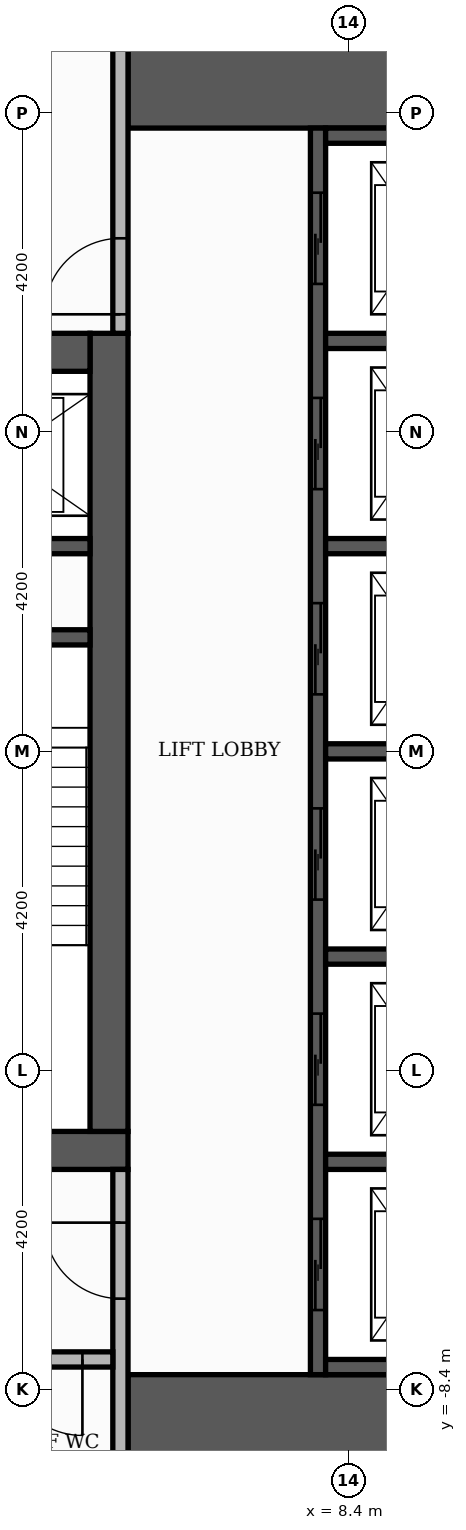
"""IFC4 building model, lengths in metres.
Left out: names, types, materials, properties, quantities, classifications, styles, units other than length and angle.
Written with IfcOpenShell. Run it as: python <this file> out.ifc"""

import sys

from ifc_helpers import new_model, si_unit, direction, frame, frame_2d, origin, place, context, subcontext, project, spatial, rectangle, extrude, element, fill, save


model = new_model("IFC4")
c1 = context("Model", 3, precision=1e-05, world=origin(), true_north=direction((0.0, 1.0)))
c2 = subcontext(c1, "Body", "Model", "MODEL_VIEW")
j1 = project(units=[si_unit("LENGTHUNIT", "METRE"), si_unit("PLANEANGLEUNIT", "RADIAN")], contexts=[c1])
p1 = place(None, origin())
s1 = spatial("IfcSite", under=j1, at=p1, CompositionType="ELEMENT")
p2 = place(p1, origin())
s2 = spatial("IfcBuilding", under=s1, at=p2, CompositionType="ELEMENT")
p3 = place(p2, frame((0.0, 0.0, 161.1)))
s3 = spatial("IfcBuildingStorey", under=s2, at=p3, CompositionType="ELEMENT", Elevation=161.1)
p4 = place(p3, frame((-5.5, -5.25, 0.0), z_axis=(0.0, 0.0, 1.0), x_axis=(1.0, 0.0, 0.0)))
e1 = element("IfcWall", 1, at=p4, inside=s3, PredefinedType="SHEAR", context=c2, shape_type="SweptSolid", body=[
    extrude(rectangle(XDim=11.0, YDim=0.5, at=frame_2d((5.5, 0.0))), origin(), (0.0, 0.0, 1.0), 3.48),
])
p5 = place(p4, frame((4.9, 0.0, 0.0)))
e2 = element("IfcOpeningElement", 2, at=p5, cuts=e1, PredefinedType="OPENING", context=c2, shape_type="SweptSolid", body=[
    extrude(rectangle(XDim=1.2, YDim=2.1, at=frame_2d((0.6, 1.05))), frame((0.0, 0.26, 0.0), z_axis=(0.0, -1.0, 0.0), x_axis=(1.0, 0.0, 0.0)), (0.0, 0.0, 1.0), 0.52),
])
p6 = place(p3, frame((5.25, -5.0, 0.0), z_axis=(0.0, 0.0, 1.0), x_axis=(0.0, 1.0, 0.0)))
e3 = element("IfcWall", 3, at=p6, inside=s3, PredefinedType="SHEAR", context=c2, shape_type="SweptSolid", body=[
    extrude(rectangle(XDim=10.5, YDim=0.5, at=frame_2d((5.25, 0.0))), origin(), (0.0, 0.0, 1.0), 3.48),
])
p7 = place(p3, frame((-5.0, 5.25, 0.0), z_axis=(0.0, 0.0, 1.0), x_axis=(1.0, 0.0, 0.0)))
e4 = element("IfcWall", 4, at=p7, inside=s3, PredefinedType="SHEAR", context=c2, shape_type="SweptSolid", body=[
    extrude(rectangle(XDim=10.0, YDim=0.5, at=frame_2d((5.0, 0.0))), origin(), (0.0, 0.0, 1.0), 3.48),
])
p8 = place(p7, frame((4.4, 0.0, 0.0)))
e5 = element("IfcOpeningElement", 5, at=p8, cuts=e4, PredefinedType="OPENING", context=c2, shape_type="SweptSolid", body=[
    extrude(rectangle(XDim=1.2, YDim=2.1, at=frame_2d((0.6, 1.05))), frame((0.0, 0.26, 0.0), z_axis=(0.0, -1.0, 0.0), x_axis=(1.0, 0.0, 0.0)), (0.0, 0.0, 1.0), 0.52),
])
for number, where, z_axis, x_axis in (
    (6, (5.5, -9.15, 0.0), (0.0, 0.0, 1.0), (1.0, 0.0, 0.0)),
    (7, (5.5, 9.15, 0.0), (0.0, 0.0, 1.0), (1.0, 0.0, 0.0)),
):
    element("IfcWall", number, at=place(p3, frame(where, z_axis=z_axis, x_axis=x_axis)), inside=s3, PredefinedType="SHEAR", context=c2, shape_type="SweptSolid", body=[
        extrude(rectangle(XDim=4.6, YDim=1.9, at=frame_2d((2.3, 0.0))), origin(), (0.0, 0.0, 1.0), 3.48),
    ])
p9 = place(p3, frame((2.15, 1.5, 0.0), z_axis=(0.0, 0.0, 1.0), x_axis=(1.0, 0.0, 0.0)))
e8 = element("IfcWall", 8, at=p9, inside=s3, PredefinedType="SHEAR", context=c2, shape_type="SweptSolid", body=[
    extrude(rectangle(XDim=2.85, YDim=0.2, at=frame_2d((1.425, 0.0))), origin(), (0.0, 0.0, 1.0), 3.48),
])
p10 = place(p3, frame((8.0, -8.2, 0.0), z_axis=(0.0, 0.0, 1.0), x_axis=(0.0, 1.0, 0.0)))
e9 = element("IfcWall", 9, at=p10, inside=s3, PredefinedType="SHEAR", context=c2, shape_type="SweptSolid", body=[
    extrude(rectangle(XDim=16.4, YDim=0.2, at=frame_2d((8.2, 0.0))), origin(), (0.0, 0.0, 1.0), 3.48),
])
p11 = place(p10, frame((0.85, 0.0, 0.0)))
e10 = element("IfcOpeningElement", 10, at=p11, cuts=e9, PredefinedType="OPENING", context=c2, shape_type="SweptSolid", body=[
    extrude(rectangle(XDim=1.2, YDim=2.1, at=frame_2d((0.6, 1.05))), frame((0.0, 0.11, 0.0), z_axis=(0.0, -1.0, 0.0), x_axis=(1.0, 0.0, 0.0)), (0.0, 0.0, 1.0), 0.22),
])
p12 = place(p10, frame((3.55, 0.0, 0.0)))
e11 = element("IfcOpeningElement", 11, at=p12, cuts=e9, PredefinedType="OPENING", context=c2, shape_type="SweptSolid", body=[
    extrude(rectangle(XDim=1.2, YDim=2.1, at=frame_2d((0.6, 1.05))), frame((0.0, 0.11, 0.0), z_axis=(0.0, -1.0, 0.0), x_axis=(1.0, 0.0, 0.0)), (0.0, 0.0, 1.0), 0.22),
])
p13 = place(p10, frame((6.25, 0.0, 0.0)))
e12 = element("IfcOpeningElement", 12, at=p13, cuts=e9, PredefinedType="OPENING", context=c2, shape_type="SweptSolid", body=[
    extrude(rectangle(XDim=1.2, YDim=2.1, at=frame_2d((0.6, 1.05))), frame((0.0, 0.11, 0.0), z_axis=(0.0, -1.0, 0.0), x_axis=(1.0, 0.0, 0.0)), (0.0, 0.0, 1.0), 0.22),
])
p14 = place(p10, frame((8.95, 0.0, 0.0)))
e13 = element("IfcOpeningElement", 13, at=p14, cuts=e9, PredefinedType="OPENING", context=c2, shape_type="SweptSolid", body=[
    extrude(rectangle(XDim=1.2, YDim=2.1, at=frame_2d((0.6, 1.05))), frame((0.0, 0.11, 0.0), z_axis=(0.0, -1.0, 0.0), x_axis=(1.0, 0.0, 0.0)), (0.0, 0.0, 1.0), 0.22),
])
p15 = place(p10, frame((11.65, 0.0, 0.0)))
e14 = element("IfcOpeningElement", 14, at=p15, cuts=e9, PredefinedType="OPENING", context=c2, shape_type="SweptSolid", body=[
    extrude(rectangle(XDim=1.2, YDim=2.1, at=frame_2d((0.6, 1.05))), frame((0.0, 0.11, 0.0), z_axis=(0.0, -1.0, 0.0), x_axis=(1.0, 0.0, 0.0)), (0.0, 0.0, 1.0), 0.22),
])
p16 = place(p10, frame((14.35, 0.0, 0.0)))
e15 = element("IfcOpeningElement", 15, at=p16, cuts=e9, PredefinedType="OPENING", context=c2, shape_type="SweptSolid", body=[
    extrude(rectangle(XDim=1.2, YDim=2.1, at=frame_2d((0.6, 1.05))), frame((0.0, 0.11, 0.0), z_axis=(0.0, -1.0, 0.0), x_axis=(1.0, 0.0, 0.0)), (0.0, 0.0, 1.0), 0.22),
])
for number, where, z_axis, x_axis in (
    (16, (8.1, -8.1, 0.0), (0.0, 0.0, 1.0), (1.0, 0.0, 0.0)),
    (17, (8.1, -5.4, 0.0), (0.0, 0.0, 1.0), (1.0, 0.0, 0.0)),
    (18, (8.1, -2.7, 0.0), (0.0, 0.0, 1.0), (1.0, 0.0, 0.0)),
    (19, (8.1, 0.0, 0.0), (0.0, 0.0, 1.0), (1.0, 0.0, 0.0)),
):
    element("IfcWall", number, at=place(p3, frame(where, z_axis=z_axis, x_axis=x_axis)), inside=s3, PredefinedType="SHEAR", context=c2, shape_type="SweptSolid", body=[
        extrude(rectangle(XDim=2.0, YDim=0.2, at=frame_2d((1.0, 0.0))), origin(), (0.0, 0.0, 1.0), 3.48),
    ])
p17 = place(p3, frame((2.15, 2.7, 0.0), z_axis=(0.0, 0.0, 1.0), x_axis=(1.0, 0.0, 0.0)))
e20 = element("IfcWall", 20, at=p17, inside=s3, PredefinedType="SHEAR", context=c2, shape_type="SweptSolid", body=[
    extrude(rectangle(XDim=2.85, YDim=0.2, at=frame_2d((1.425, 0.0))), origin(), (0.0, 0.0, 1.0), 3.48),
])
for number, where, z_axis, x_axis in (
    (21, (8.1, 2.7, 0.0), (0.0, 0.0, 1.0), (1.0, 0.0, 0.0)),
    (22, (8.1, 5.4, 0.0), (0.0, 0.0, 1.0), (1.0, 0.0, 0.0)),
    (23, (8.1, 8.1, 0.0), (0.0, 0.0, 1.0), (1.0, 0.0, 0.0)),
):
    element("IfcWall", number, at=place(p3, frame(where, z_axis=z_axis, x_axis=x_axis)), inside=s3, PredefinedType="SHEAR", context=c2, shape_type="SweptSolid", body=[
        extrude(rectangle(XDim=2.0, YDim=0.2, at=frame_2d((1.0, 0.0))), origin(), (0.0, 0.0, 1.0), 3.48),
    ])
p18 = place(p3, frame((5.4, -10.1, 0.0), z_axis=(0.0, 0.0, 1.0), x_axis=(0.0, 1.0, 0.0)))
e24 = element("IfcWall", 24, at=p18, inside=s3, PredefinedType="PARTITIONING", context=c2, shape_type="SweptSolid", body=[
    extrude(rectangle(XDim=4.6, YDim=0.2, at=frame_2d((2.3, 0.0))), origin(), (0.0, 0.0, 1.0), 3.48),
])
p19 = place(p18, frame((2.9, 0.0, 0.0)))
e25 = element("IfcOpeningElement", 25, at=p19, cuts=e24, PredefinedType="OPENING", context=c2, shape_type="SweptSolid", body=[
    extrude(rectangle(XDim=1.0, YDim=2.1, at=frame_2d((0.5, 1.05))), frame((0.0, 0.11, 0.0), z_axis=(0.0, -1.0, 0.0), x_axis=(1.0, 0.0, 0.0)), (0.0, 0.0, 1.0), 0.22),
])
p20 = place(p3, frame((3.55, -8.0, 0.0), z_axis=(0.0, 0.0, 1.0), x_axis=(1.0, 0.0, 0.0)))
e26 = element("IfcWall", 26, at=p20, inside=s3, PredefinedType="PARTITIONING", context=c2, shape_type="SweptSolid", body=[
    extrude(rectangle(XDim=1.75, YDim=0.2, at=frame_2d((0.875, 0.0))), origin(), (0.0, 0.0, 1.0), 3.48),
])
p21 = place(p20, frame((0.35, 0.0, 0.0)))
e27 = element("IfcOpeningElement", 27, at=p21, cuts=e26, PredefinedType="OPENING", context=c2, shape_type="SweptSolid", body=[
    extrude(rectangle(XDim=1.0, YDim=2.1, at=frame_2d((0.5, 1.05))), frame((0.0, 0.11, 0.0), z_axis=(0.0, -1.0, 0.0), x_axis=(1.0, 0.0, 0.0)), (0.0, 0.0, 1.0), 0.22),
])
p22 = place(p3, frame((5.4, 5.5, 0.0), z_axis=(0.0, 0.0, 1.0), x_axis=(0.0, 1.0, 0.0)))
e28 = element("IfcWall", 28, at=p22, inside=s3, PredefinedType="PARTITIONING", context=c2, shape_type="SweptSolid", body=[
    extrude(rectangle(XDim=4.6, YDim=0.2, at=frame_2d((2.3, 0.0))), origin(), (0.0, 0.0, 1.0), 3.48),
])
p23 = place(p22, frame((0.25, 0.0, 0.0)))
e29 = element("IfcOpeningElement", 29, at=p23, cuts=e28, PredefinedType="OPENING", context=c2, shape_type="SweptSolid", body=[
    extrude(rectangle(XDim=1.0, YDim=2.1, at=frame_2d((0.5, 1.05))), frame((0.0, 0.11, 0.0), z_axis=(0.0, -1.0, 0.0), x_axis=(1.0, 0.0, 0.0)), (0.0, 0.0, 1.0), 0.22),
])
p24 = place(p11, origin())
e30 = element("IfcDoor", 30, at=p24, inside=s3, OperationType="SLIDING_TO_LEFT", PredefinedType="DOOR", context=c2, shape_type="SweptSolid", body=[
    extrude(rectangle(XDim=1.2, YDim=2.1, at=frame_2d((0.6, 1.05))), frame((0.0, 0.025, 0.0), z_axis=(0.0, -1.0, 0.0), x_axis=(1.0, 0.0, 0.0)), (0.0, 0.0, 1.0), 0.05),
])
fill(e10, e30)
p25 = place(p12, origin())
e31 = element("IfcDoor", 31, at=p25, inside=s3, OperationType="SLIDING_TO_LEFT", PredefinedType="DOOR", context=c2, shape_type="SweptSolid", body=[
    extrude(rectangle(XDim=1.2, YDim=2.1, at=frame_2d((0.6, 1.05))), frame((0.0, 0.025, 0.0), z_axis=(0.0, -1.0, 0.0), x_axis=(1.0, 0.0, 0.0)), (0.0, 0.0, 1.0), 0.05),
])
fill(e11, e31)
p26 = place(p13, origin())
e32 = element("IfcDoor", 32, at=p26, inside=s3, OperationType="SLIDING_TO_LEFT", PredefinedType="DOOR", context=c2, shape_type="SweptSolid", body=[
    extrude(rectangle(XDim=1.2, YDim=2.1, at=frame_2d((0.6, 1.05))), frame((0.0, 0.025, 0.0), z_axis=(0.0, -1.0, 0.0), x_axis=(1.0, 0.0, 0.0)), (0.0, 0.0, 1.0), 0.05),
])
fill(e12, e32)
p27 = place(p14, origin())
e33 = element("IfcDoor", 33, at=p27, inside=s3, OperationType="SLIDING_TO_LEFT", PredefinedType="DOOR", context=c2, shape_type="SweptSolid", body=[
    extrude(rectangle(XDim=1.2, YDim=2.1, at=frame_2d((0.6, 1.05))), frame((0.0, 0.025, 0.0), z_axis=(0.0, -1.0, 0.0), x_axis=(1.0, 0.0, 0.0)), (0.0, 0.0, 1.0), 0.05),
])
fill(e13, e33)
p28 = place(p15, origin())
e34 = element("IfcDoor", 34, at=p28, inside=s3, OperationType="SLIDING_TO_LEFT", PredefinedType="DOOR", context=c2, shape_type="SweptSolid", body=[
    extrude(rectangle(XDim=1.2, YDim=2.1, at=frame_2d((0.6, 1.05))), frame((0.0, 0.025, 0.0), z_axis=(0.0, -1.0, 0.0), x_axis=(1.0, 0.0, 0.0)), (0.0, 0.0, 1.0), 0.05),
])
fill(e14, e34)
p29 = place(p16, origin())
e35 = element("IfcDoor", 35, at=p29, inside=s3, OperationType="SLIDING_TO_LEFT", PredefinedType="DOOR", context=c2, shape_type="SweptSolid", body=[
    extrude(rectangle(XDim=1.2, YDim=2.1, at=frame_2d((0.6, 1.05))), frame((0.0, 0.025, 0.0), z_axis=(0.0, -1.0, 0.0), x_axis=(1.0, 0.0, 0.0)), (0.0, 0.0, 1.0), 0.05),
])
fill(e15, e35)
p30 = place(p23, origin())
e36 = element("IfcDoor", 36, at=p30, inside=s3, OperationType="SINGLE_SWING_LEFT", PredefinedType="DOOR", context=c2, shape_type="SweptSolid", body=[
    extrude(rectangle(XDim=1.0, YDim=2.1, at=frame_2d((0.5, 1.05))), frame((0.0, 0.025, 0.0), z_axis=(0.0, -1.0, 0.0), x_axis=(1.0, 0.0, 0.0)), (0.0, 0.0, 1.0), 0.05),
])
fill(e29, e36)
p31 = place(p19, origin())
e37 = element("IfcDoor", 37, at=p31, inside=s3, OperationType="SINGLE_SWING_RIGHT", PredefinedType="DOOR", context=c2, shape_type="SweptSolid", body=[
    extrude(rectangle(XDim=1.0, YDim=2.1, at=frame_2d((0.5, 1.05))), frame((0.0, 0.025, 0.0), z_axis=(0.0, -1.0, 0.0), x_axis=(1.0, 0.0, 0.0)), (0.0, 0.0, 1.0), 0.05),
])
fill(e25, e37)
p32 = place(p21, frame((1.0, 0.0, 0.0), z_axis=(0.0, 0.0, 1.0), x_axis=(-1.0, 0.0, 0.0)))
e38 = element("IfcDoor", 38, at=p32, inside=s3, OperationType="SINGLE_SWING_RIGHT", PredefinedType="DOOR", context=c2, shape_type="SweptSolid", body=[
    extrude(rectangle(XDim=1.0, YDim=2.1, at=frame_2d((0.5, 1.05))), frame((0.0, 0.025, 0.0), z_axis=(0.0, -1.0, 0.0), x_axis=(1.0, 0.0, 0.0)), (0.0, 0.0, 1.0), 0.05),
])
fill(e27, e38)
save(model, sys.argv[1])
